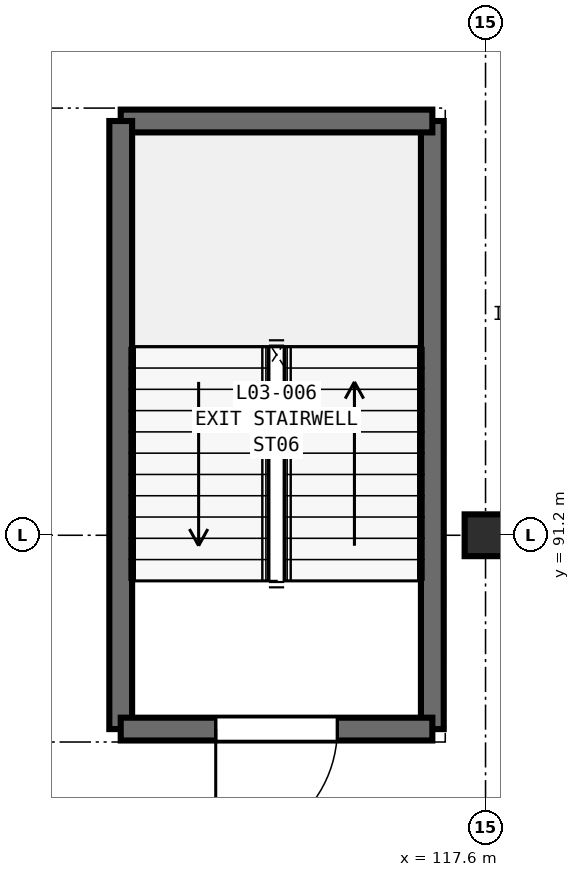
"""IFC4 building model, lengths in metres.
Left out: names, types, materials, properties, quantities, classifications, styles, units other than length and angle.
Written with IfcOpenShell. Run it as: python <this file> out.ifc"""

import sys

from ifc_helpers import new_model, si_unit, direction, frame, frame_2d, origin, origin_2d, place, context, subcontext, project, spatial, rectangle, extrude, element, fill, save


model = new_model("IFC4")
c1 = context("Model", 3, precision=1e-05, world=origin(), true_north=direction((0.0, 1.0)))
c2 = subcontext(c1, "Body", "Model", "MODEL_VIEW")
j1 = project(units=[si_unit("LENGTHUNIT", "METRE"), si_unit("PLANEANGLEUNIT", "RADIAN")], contexts=[c1])
p1 = place(None, origin())
s1 = spatial("IfcSite", under=j1, at=p1, CompositionType="ELEMENT")
p2 = place(p1, origin())
s2 = spatial("IfcBuilding", under=s1, at=p2, CompositionType="ELEMENT")
p3 = place(p2, frame((0.0, 0.0, 16.2)))
s3 = spatial("IfcBuildingStorey", under=s2, at=p3, CompositionType="ELEMENT", Elevation=16.2)
p4 = place(p3, frame((117.6, 91.2, 0.0), z_axis=(0.0, 0.0, 1.0), x_axis=(1.0, 0.0, 0.0)))
e1 = element("IfcColumn", 1, at=p4, inside=s3, PredefinedType="COLUMN", context=c2, shape_type="SweptSolid", body=[
    extrude(rectangle(XDim=0.55, YDim=0.55, at=origin_2d()), origin(), (0.0, 0.0, 1.0), 4.2),
])
p5 = place(p3, frame((116.9, 88.65, 0.0), z_axis=(0.0, 0.0, 1.0), x_axis=(0.0, 1.0, 0.0)))
e2 = element("IfcWall", 2, at=p5, inside=s3, PredefinedType="SHEAR", context=c2, shape_type="SweptSolid", body=[
    extrude(rectangle(XDim=8.0, YDim=0.3, at=frame_2d((4.0, 0.0))), origin(), (0.0, 0.0, 1.0), 4.2),
])
p6 = place(p3, frame((116.9, 96.65, 0.0), z_axis=(0.0, 0.0, 1.0), x_axis=(-1.0, 0.0, 0.0)))
e3 = element("IfcWall", 3, at=p6, inside=s3, PredefinedType="SHEAR", context=c2, shape_type="SweptSolid", body=[
    extrude(rectangle(XDim=4.1, YDim=0.3, at=frame_2d((2.05, 0.0))), origin(), (0.0, 0.0, 1.0), 4.2),
])
p7 = place(p3, frame((112.8, 96.65, 0.0), z_axis=(0.0, 0.0, 1.0), x_axis=(0.0, -1.0, 0.0)))
e4 = element("IfcWall", 4, at=p7, inside=s3, PredefinedType="SHEAR", context=c2, shape_type="SweptSolid", body=[
    extrude(rectangle(XDim=8.0, YDim=0.3, at=frame_2d((4.0, 0.0))), origin(), (0.0, 0.0, 1.0), 4.2),
])
p8 = place(p3, frame((112.8, 88.65, 0.0), z_axis=(0.0, 0.0, 1.0), x_axis=(1.0, 0.0, 0.0)))
e5 = element("IfcWall", 5, at=p8, inside=s3, PredefinedType="SHEAR", context=c2, shape_type="SweptSolid", body=[
    extrude(rectangle(XDim=4.1, YDim=0.3, at=frame_2d((2.05, 0.0))), origin(), (0.0, 0.0, 1.0), 4.2),
])
p9 = place(p8, frame((1.25, 0.0, 0.0)))
e6 = element("IfcOpeningElement", 6, at=p9, cuts=e5, PredefinedType="OPENING", context=c2, shape_type="SweptSolid", body=[
    extrude(rectangle(XDim=1.6, YDim=2.25, at=frame_2d((0.8, 1.125))), frame((0.0, 0.16, 0.0), z_axis=(0.0, -1.0, 0.0), x_axis=(1.0, 0.0, 0.0)), (0.0, 0.0, 1.0), 0.32),
])
p10 = place(p9, frame((1.6, 0.0, 0.0), z_axis=(0.0, 0.0, 1.0), x_axis=(-1.0, 0.0, 0.0)))
e7 = element("IfcDoor", 7, at=p10, inside=s3, OperationType="SINGLE_SWING_RIGHT", PredefinedType="DOOR", context=c2, shape_type="SweptSolid", body=[
    extrude(rectangle(XDim=1.6, YDim=2.25, at=frame_2d((0.8, 1.125))), frame((0.0, 0.025, 0.0), z_axis=(0.0, -1.0, 0.0), x_axis=(1.0, 0.0, 0.0)), (0.0, 0.0, 1.0), 0.05),
])
fill(e6, e7)
save(model, sys.argv[1])
